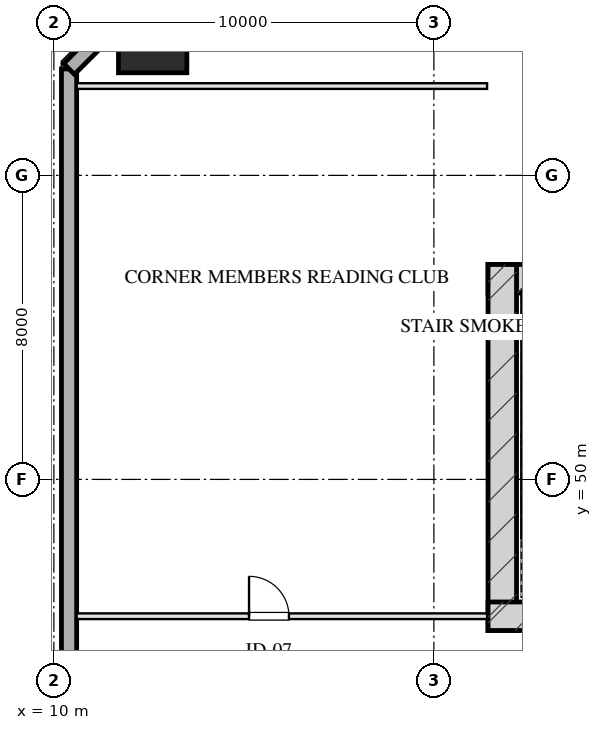
"""IFC4 building model, lengths in metres.
Left out: names, types, materials, properties, quantities, classifications, styles, units other than length and angle.
Written with IfcOpenShell. Run it as: python <this file> out.ifc"""

import sys

from ifc_helpers import new_model, si_unit, direction, frame, frame_2d, origin, origin_2d, place, context, subcontext, project, spatial, rectangle, hollow_rectangle, extrude, element, fill, save


model = new_model("IFC4")
c1 = context("Model", 3, precision=1e-05, world=origin(), true_north=direction((0.0, 1.0)))
c2 = subcontext(c1, "Body", "Model", "MODEL_VIEW")
j1 = project(units=[si_unit("LENGTHUNIT", "METRE"), si_unit("PLANEANGLEUNIT", "RADIAN")], contexts=[c1])
p1 = place(None, origin())
s1 = spatial("IfcSite", under=j1, at=p1, CompositionType="ELEMENT")
p2 = place(p1, origin())
s2 = spatial("IfcBuilding", under=s1, at=p2, CompositionType="ELEMENT")
p3 = place(p2, frame((0.0, 0.0, 57.5)))
s3 = spatial("IfcBuildingStorey", under=s2, at=p3, CompositionType="ELEMENT", Elevation=57.5)
p4 = place(p3, frame((21.425, 55.28, 0.0), z_axis=(0.0, 0.0, 1.0), x_axis=(1.0, 0.0, 0.0)))
e1 = element("IfcWall", 1, at=p4, inside=s3, PredefinedType="SHEAR", context=c2, shape_type="SweptSolid", body=[
    extrude(rectangle(XDim=17.15, YDim=0.75, at=frame_2d((8.575, 0.0))), origin(), (0.0, 0.0, 1.0), 3.45),
])
p5 = place(p3, frame((21.8, 46.025, 0.0), z_axis=(0.0, 0.0, 1.0), x_axis=(0.0, 1.0, 0.0)))
e2 = element("IfcWall", 2, at=p5, inside=s3, PredefinedType="SHEAR", context=c2, shape_type="SweptSolid", body=[
    extrude(rectangle(XDim=9.63, YDim=0.75, at=frame_2d((4.815, 0.0))), origin(), (0.0, 0.0, 1.0), 3.45),
])
p6 = place(p3, frame((21.425, 46.4, 0.0), z_axis=(0.0, 0.0, 1.0), x_axis=(1.0, 0.0, 0.0)))
e3 = element("IfcWall", 3, at=p6, inside=s3, PredefinedType="SHEAR", context=c2, shape_type="SweptSolid", body=[
    extrude(rectangle(XDim=4.295, YDim=0.75, at=frame_2d((2.147, 0.0))), origin(), (0.0, 0.0, 1.0), 3.45),
])
p7 = place(p3, frame((12.6, 61.6, 0.0), z_axis=(0.0, 0.0, 1.0), x_axis=(1.0, 0.0, 0.0)))
e4 = element("IfcColumn", 4, at=p7, inside=s3, PredefinedType="COLUMN", context=c2, shape_type="SweptSolid", body=[
    extrude(hollow_rectangle(XDim=1.8, YDim=1.8, WallThickness=0.06, at=origin_2d()), origin(), (0.0, 0.0, 1.0), 3.451),
])
p8 = place(p3, frame((10.4, 7.2, 0.0), z_axis=(0.0, 0.0, 1.0), x_axis=(0.0, 1.0, 0.0)))
e5 = element("IfcWall", 5, at=p8, inside=s3, PredefinedType="SOLIDWALL", context=c2, shape_type="SweptSolid", body=[
    extrude(rectangle(XDim=53.6, YDim=0.4, at=frame_2d((26.8, 0.0))), origin(), (0.0, 0.0, 1.0), 2.61),
])
p9 = place(p8, frame((19.15, 0.0, 0.75)))
e6 = element("IfcOpeningElement", 6, at=p9, cuts=e5, PredefinedType="OPENING", context=c2, shape_type="SweptSolid", body=[
    extrude(rectangle(XDim=2.5, YDim=1.46, at=frame_2d((1.25, 0.73))), frame((0.0, 0.21, 0.0), z_axis=(0.0, -1.0, 0.0), x_axis=(1.0, 0.0, 0.0)), (0.0, 0.0, 1.0), 0.42),
])
p10 = place(p8, frame((22.95, 0.0, 0.75)))
e7 = element("IfcOpeningElement", 7, at=p10, cuts=e5, PredefinedType="OPENING", context=c2, shape_type="SweptSolid", body=[
    extrude(rectangle(XDim=2.5, YDim=1.46, at=frame_2d((1.25, 0.73))), frame((0.0, 0.21, 0.0), z_axis=(0.0, -1.0, 0.0), x_axis=(1.0, 0.0, 0.0)), (0.0, 0.0, 1.0), 0.42),
])
p11 = place(p8, frame((32.05, 0.0, 0.0)))
e8 = element("IfcOpeningElement", 8, at=p11, cuts=e5, PredefinedType="OPENING", context=c2, shape_type="SweptSolid", body=[
    extrude(rectangle(XDim=1.1, YDim=2.15, at=frame_2d((0.55, 1.075))), frame((0.0, 0.21, 0.0), z_axis=(0.0, -1.0, 0.0), x_axis=(1.0, 0.0, 0.0)), (0.0, 0.0, 1.0), 0.42),
])
p12 = place(p3, frame((10.4, 60.8, 0.0), z_axis=(0.0, 0.0, 1.0), x_axis=(0.707106781187, 0.707106781187, 0.0)))
e9 = element("IfcWall", 9, at=p12, inside=s3, PredefinedType="SOLIDWALL", context=c2, shape_type="SweptSolid", body=[
    extrude(rectangle(XDim=4.243, YDim=0.4, at=frame_2d((2.121, 0.0))), origin(), (0.0, 0.0, 1.0), 2.61),
])
p13 = place(p3, frame((10.6, 60.35, 0.0), z_axis=(0.0, 0.0, 1.0), x_axis=(1.0, 0.0, 0.0)))
e10 = element("IfcWall", 10, at=p13, inside=s3, PredefinedType="PARTITIONING", context=c2, shape_type="SweptSolid", body=[
    extrude(rectangle(XDim=10.8, YDim=0.15, at=frame_2d((5.4, 0.0))), origin(), (0.0, 0.0, 1.0), 3.175),
])
p14 = place(p3, frame((10.6, 46.4, 0.0), z_axis=(0.0, 0.0, 1.0), x_axis=(1.0, 0.0, 0.0)))
e11 = element("IfcWall", 11, at=p14, inside=s3, PredefinedType="PARTITIONING", context=c2, shape_type="SweptSolid", body=[
    extrude(rectangle(XDim=10.8, YDim=0.15, at=frame_2d((5.4, 0.0))), origin(), (0.0, 0.0, 1.0), 3.175),
])
p15 = place(p14, frame((4.536, 0.0, 0.0)))
e12 = element("IfcOpeningElement", 12, at=p15, cuts=e11, PredefinedType="OPENING", context=c2, shape_type="SweptSolid", body=[
    extrude(rectangle(XDim=1.05, YDim=2.05, at=frame_2d((0.525, 1.025))), frame((0.0, 0.085, 0.0), z_axis=(0.0, -1.0, 0.0), x_axis=(1.0, 0.0, 0.0)), (0.0, 0.0, 1.0), 0.17),
])
p16 = place(p15, origin())
e13 = element("IfcDoor", 13, at=p16, inside=s3, OperationType="SINGLE_SWING_LEFT", PredefinedType="DOOR", context=c2, shape_type="SweptSolid", body=[
    extrude(rectangle(XDim=1.05, YDim=2.05, at=frame_2d((0.525, 1.025))), frame((0.0, 0.025, 0.0), z_axis=(0.0, -1.0, 0.0), x_axis=(1.0, 0.0, 0.0)), (0.0, 0.0, 1.0), 0.05),
])
fill(e12, e13)
save(model, sys.argv[1])
